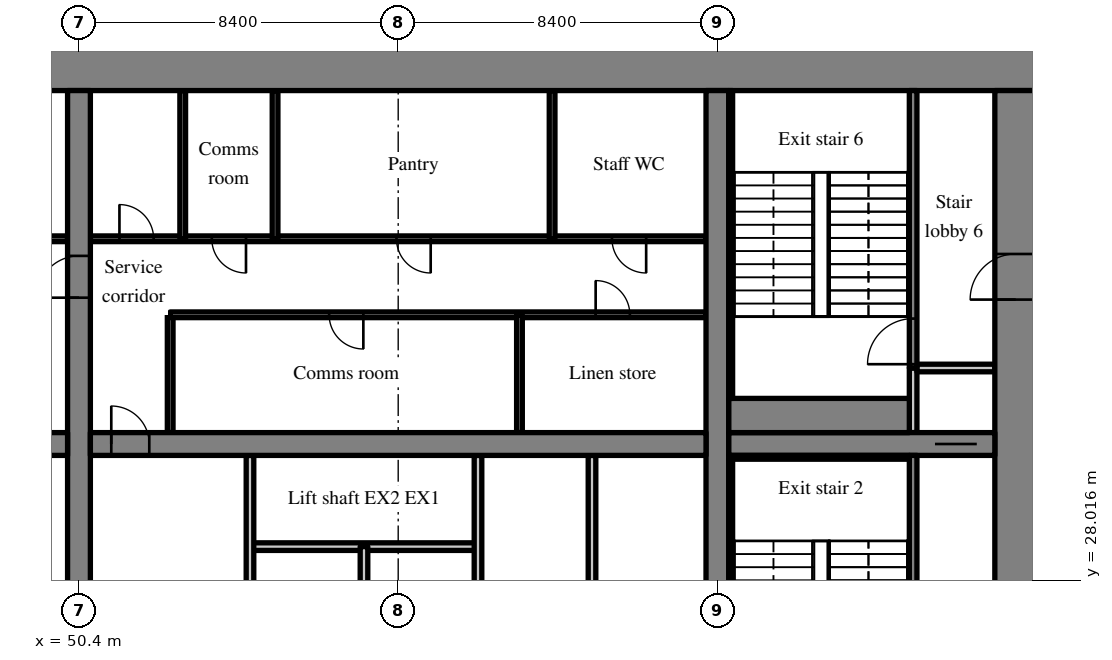
"""IFC4 building model, lengths in metres.
Left out: names, types, materials, properties, quantities, classifications, styles, units other than length and angle.
Written with IfcOpenShell. Run it as: python <this file> out.ifc"""

import sys

from ifc_helpers import new_model, si_unit, direction, frame, frame_2d, origin, place, context, subcontext, project, spatial, rectangle, extrude, source, transform, mapped, element, fill, save


model = new_model("IFC4")
c1 = context("Model", 3, precision=1e-05, world=origin(), true_north=direction((0.0, 1.0)))
c2 = subcontext(c1, "Body", "Model", "MODEL_VIEW")
j1 = project(units=[si_unit("LENGTHUNIT", "METRE"), si_unit("PLANEANGLEUNIT", "RADIAN")], contexts=[c1])
p1 = place(None, origin())
s1 = spatial("IfcSite", under=j1, at=p1, CompositionType="ELEMENT")
p2 = place(p1, origin())
s2 = spatial("IfcBuilding", under=s1, at=p2, CompositionType="ELEMENT")
p3 = place(p2, frame((0.0, 0.0, 43.0)))
s3 = spatial("IfcBuildingStorey", under=s2, at=p3, CompositionType="ELEMENT", Elevation=43.0)
m1 = source(origin(), c2, "Body", "SweptSolid", [
    extrude(rectangle(XDim=50.4, YDim=1.1, at=frame_2d((25.2, 0.0))), origin(), (0.0, 0.0, 1.0), 3.52),
])
p4 = place(p3, frame((25.2, 41.45, 0.0), z_axis=(0.0, 0.0, 1.0), x_axis=(1.0, 0.0, 0.0)))
e1 = element("IfcWall", 1, at=p4, inside=s3, PredefinedType="SHEAR", context=c2, shape_type="MappedRepresentation", body=[
    mapped(m1, transform((0.0, 0.0, 0.0), scale=1.0)),
])
m2 = source(origin(), c2, "Body", "SweptSolid", [
    extrude(rectangle(XDim=17.8, YDim=1.1, at=frame_2d((8.9, 0.0))), origin(), (0.0, 0.0, 1.0), 3.52),
])
p5 = place(p3, frame((75.05, 23.1, 0.0), z_axis=(0.0, 0.0, 1.0), x_axis=(0.0, 1.0, 0.0)))
e2 = element("IfcWall", 2, at=p5, inside=s3, PredefinedType="SHEAR", context=c2, shape_type="MappedRepresentation", body=[
    mapped(m2, transform((0.0, 0.0, 0.0), scale=1.0)),
])
m3 = source(origin(), c2, "Body", "SweptSolid", [
    extrude(rectangle(XDim=1.0, YDim=2.1, at=frame_2d((0.5, 1.05))), frame((0.0, 0.56, 0.0), z_axis=(0.0, -1.0, 0.0), x_axis=(1.0, 0.0, 0.0)), (0.0, 0.0, 1.0), 1.12),
])
p6 = place(p5, frame((2.4, 0.0, 0.0)))
e3 = element("IfcOpeningElement", 3, at=p6, cuts=e2, PredefinedType="OPENING", context=c2, shape_type="MappedRepresentation", body=[
    mapped(m3, transform((0.0, 0.0, 0.0), scale=1.0)),
])
m4 = source(origin(), c2, "Body", "SweptSolid", [
    extrude(rectangle(XDim=1.2, YDim=2.1, at=frame_2d((0.6, 1.05))), frame((0.0, 0.56, 0.0), z_axis=(0.0, -1.0, 0.0), x_axis=(1.0, 0.0, 0.0)), (0.0, 0.0, 1.0), 1.12),
])
p7 = place(p5, frame((12.3, 0.0, 0.0)))
e4 = element("IfcOpeningElement", 4, at=p7, cuts=e2, PredefinedType="OPENING", context=c2, shape_type="MappedRepresentation", body=[
    mapped(m4, transform((0.0, 0.0, 0.0), scale=1.0)),
])
m5 = source(origin(), c2, "Body", "SweptSolid", [
    extrude(rectangle(XDim=17.8, YDim=0.6, at=frame_2d((8.9, 0.0))), origin(), (0.0, 0.0, 1.0), 3.52),
])
p8 = place(p3, frame((50.4, 23.1, 0.0), z_axis=(0.0, 0.0, 1.0), x_axis=(0.0, 1.0, 0.0)))
e5 = element("IfcWall", 5, at=p8, inside=s3, PredefinedType="SHEAR", context=c2, shape_type="MappedRepresentation", body=[
    mapped(m5, transform((0.0, 0.0, 0.0), scale=1.0)),
])
m6 = source(origin(), c2, "Body", "SweptSolid", [
    extrude(rectangle(XDim=1.1, YDim=2.1, at=frame_2d((0.55, 1.05))), frame((0.0, 0.31, 0.0), z_axis=(0.0, -1.0, 0.0), x_axis=(1.0, 0.0, 0.0)), (0.0, 0.0, 1.0), 0.62),
])
p9 = place(p8, frame((12.35, 0.0, 0.0)))
e6 = element("IfcOpeningElement", 6, at=p9, cuts=e5, PredefinedType="OPENING", context=c2, shape_type="MappedRepresentation", body=[
    mapped(m6, transform((0.0, 0.0, 0.0), scale=1.0)),
])
p10 = place(p3, frame((67.2, 23.1, 0.0), z_axis=(0.0, 0.0, 1.0), x_axis=(0.0, 1.0, 0.0)))
e7 = element("IfcWall", 7, at=p10, inside=s3, PredefinedType="SHEAR", context=c2, shape_type="MappedRepresentation", body=[
    mapped(m5, transform((0.0, 0.0, 0.0), scale=1.0)),
])
m7 = source(origin(), c2, "Body", "SweptSolid", [
    extrude(rectangle(XDim=16.2, YDim=0.6, at=frame_2d((8.1, 0.0))), origin(), (0.0, 0.0, 1.0), 3.52),
])
p11 = place(p3, frame((33.9, 31.6, 0.0), z_axis=(0.0, 0.0, 1.0), x_axis=(1.0, 0.0, 0.0)))
e8 = element("IfcWall", 8, at=p11, inside=s3, PredefinedType="SHEAR", context=c2, shape_type="MappedRepresentation", body=[
    mapped(m7, transform((0.0, 0.0, 0.0), scale=1.0)),
])
m8 = source(origin(), c2, "Body", "SweptSolid", [
    extrude(rectangle(XDim=1.0, YDim=2.1, at=frame_2d((0.5, 1.05))), frame((0.0, 0.31, 0.0), z_axis=(0.0, -1.0, 0.0), x_axis=(1.0, 0.0, 0.0)), (0.0, 0.0, 1.0), 0.62),
])
p12 = place(p11, frame((14.65, 0.0, 0.0)))
e9 = element("IfcOpeningElement", 9, at=p12, cuts=e8, PredefinedType="OPENING", context=c2, shape_type="MappedRepresentation", body=[
    mapped(m8, transform((0.0, 0.0, 0.0), scale=1.0)),
])
m9 = source(origin(), c2, "Body", "SweptSolid", [
    extrude(rectangle(XDim=16.2, YDim=0.6, at=frame_2d((8.1, 0.0))), origin(), (0.0, 0.0, 1.0), 3.52),
])
p13 = place(p3, frame((50.7, 31.6, 0.0), z_axis=(0.0, 0.0, 1.0), x_axis=(1.0, 0.0, 0.0)))
e10 = element("IfcWall", 10, at=p13, inside=s3, PredefinedType="SHEAR", context=c2, shape_type="MappedRepresentation", body=[
    mapped(m9, transform((0.0, 0.0, 0.0), scale=1.0)),
])
p14 = place(p13, frame((0.55, 0.0, 0.0)))
e11 = element("IfcOpeningElement", 11, at=p14, cuts=e10, PredefinedType="OPENING", context=c2, shape_type="MappedRepresentation", body=[
    mapped(m8, transform((0.0, 0.0, 0.0), scale=1.0)),
])
m10 = source(origin(), c2, "Body", "SweptSolid", [
    extrude(rectangle(XDim=7.0, YDim=0.6, at=frame_2d((3.5, 0.0))), origin(), (0.0, 0.0, 1.0), 3.52),
])
p15 = place(p3, frame((67.5, 31.6, 0.0), z_axis=(0.0, 0.0, 1.0), x_axis=(1.0, 0.0, 0.0)))
e12 = element("IfcWall", 12, at=p15, inside=s3, PredefinedType="SHEAR", context=c2, shape_type="MappedRepresentation", body=[
    mapped(m10, transform((0.0, 0.0, 0.0), scale=1.0)),
])
p16 = place(p15, frame((5.425, 0.0, 0.0)))
e13 = element("IfcOpeningElement", 13, at=p16, cuts=e12, PredefinedType="OPENING", context=c2, shape_type="MappedRepresentation", body=[
    mapped(m6, transform((0.0, 0.0, 0.0), scale=1.0)),
])
m11 = source(origin(), c2, "Body", "SweptSolid", [
    extrude(rectangle(XDim=16.2, YDim=0.15, at=frame_2d((8.1, 0.0))), origin(), (0.0, 0.0, 1.0), 3.52),
])
p17 = place(p3, frame((33.9, 37.0, 0.0), z_axis=(0.0, 0.0, 1.0), x_axis=(1.0, 0.0, 0.0)))
e14 = element("IfcWall", 14, at=p17, inside=s3, PredefinedType="PARTITIONING", context=c2, shape_type="MappedRepresentation", body=[
    mapped(m11, transform((0.0, 0.0, 0.0), scale=1.0)),
])
m12 = source(origin(), c2, "Body", "SweptSolid", [
    extrude(rectangle(XDim=0.9, YDim=2.1, at=frame_2d((0.45, 1.05))), frame((0.0, 0.085, 0.0), z_axis=(0.0, -1.0, 0.0), x_axis=(1.0, 0.0, 0.0)), (0.0, 0.0, 1.0), 0.17),
])
p18 = place(p17, frame((6.435, 0.0, 0.0)))
e15 = element("IfcOpeningElement", 15, at=p18, cuts=e14, PredefinedType="OPENING", context=c2, shape_type="MappedRepresentation", body=[
    mapped(m12, transform((0.0, 0.0, 0.0), scale=1.0)),
])
p19 = place(p17, frame((14.535, 0.0, 0.0)))
e16 = element("IfcOpeningElement", 16, at=p19, cuts=e14, PredefinedType="OPENING", context=c2, shape_type="MappedRepresentation", body=[
    mapped(m12, transform((0.0, 0.0, 0.0), scale=1.0)),
])
m13 = source(origin(), c2, "Body", "SweptSolid", [
    extrude(rectangle(XDim=6.0, YDim=0.2, at=frame_2d((3.0, 0.0))), origin(), (0.0, 0.0, 1.0), 3.52),
])
p20 = place(p3, frame((60.9, 28.9, 0.0), z_axis=(0.0, 0.0, 1.0), x_axis=(-1.0, 0.0, 0.0)))
e17 = element("IfcWall", 17, at=p20, inside=s3, PredefinedType="SOLIDWALL", context=c2, shape_type="MappedRepresentation", body=[
    mapped(m13, transform((0.0, 0.0, 0.0), scale=1.0)),
])
m14 = source(origin(), c2, "Body", "SweptSolid", [
    extrude(rectangle(XDim=8.2, YDim=0.2, at=frame_2d((4.1, 0.0))), origin(), (0.0, 0.0, 1.0), 3.52),
])
for number, where, z_axis, x_axis in (
    (18, (54.9, 23.1, 0.0), (0.0, 0.0, 1.0), (0.0, 1.0, 0.0)),
    (19, (60.9, 23.1, 0.0), (0.0, 0.0, 1.0), (0.0, 1.0, 0.0)),
):
    element("IfcWall", number, at=place(p3, frame(where, z_axis=z_axis, x_axis=x_axis)), inside=s3, PredefinedType="PARTITIONING", context=c2, shape_type="MappedRepresentation", body=[
        mapped(m14, transform((0.0, 0.0, 0.0), scale=1.0)),
    ])
m15 = source(origin(), c2, "Body", "SweptSolid", [
    extrude(rectangle(XDim=5.8, YDim=0.2, at=frame_2d((2.9, 0.0))), origin(), (0.0, 0.0, 1.0), 3.52),
])
p21 = place(p3, frame((57.9, 23.1, 0.0), z_axis=(0.0, 0.0, 1.0), x_axis=(0.0, 1.0, 0.0)))
e20 = element("IfcWall", 20, at=p21, inside=s3, PredefinedType="PARTITIONING", context=c2, shape_type="MappedRepresentation", body=[
    mapped(m15, transform((0.0, 0.0, 0.0), scale=1.0)),
])
p22 = place(p3, frame((63.9, 23.1, 0.0), z_axis=(0.0, 0.0, 1.0), x_axis=(0.0, 1.0, 0.0)))
e21 = element("IfcWall", 21, at=p22, inside=s3, PredefinedType="PARTITIONING", context=c2, shape_type="MappedRepresentation", body=[
    mapped(m14, transform((0.0, 0.0, 0.0), scale=1.0)),
])
m16 = source(origin(), c2, "Body", "SweptSolid", [
    extrude(rectangle(XDim=3.1, YDim=0.15, at=frame_2d((1.55, 0.0))), origin(), (0.0, 0.0, 1.0), 3.52),
])
p23 = place(p3, frame((52.8, 31.9, 0.0), z_axis=(0.0, 0.0, 1.0), x_axis=(0.0, 1.0, 0.0)))
e22 = element("IfcWall", 22, at=p23, inside=s3, PredefinedType="PARTITIONING", context=c2, shape_type="MappedRepresentation", body=[
    mapped(m16, transform((0.0, 0.0, 0.0), scale=1.0)),
])
m17 = source(origin(), c2, "Body", "SweptSolid", [
    extrude(rectangle(XDim=14.1, YDim=0.15, at=frame_2d((7.05, 0.0))), origin(), (0.0, 0.0, 1.0), 3.52),
])
p24 = place(p3, frame((66.9, 35.0, 0.0), z_axis=(0.0, 0.0, 1.0), x_axis=(-1.0, 0.0, 0.0)))
e23 = element("IfcWall", 23, at=p24, inside=s3, PredefinedType="PARTITIONING", context=c2, shape_type="MappedRepresentation", body=[
    mapped(m17, transform((0.0, 0.0, 0.0), scale=1.0)),
])
p25 = place(p24, frame((2.004, 0.0, 0.0)))
e24 = element("IfcOpeningElement", 24, at=p25, cuts=e23, PredefinedType="OPENING", context=c2, shape_type="MappedRepresentation", body=[
    mapped(m12, transform((0.0, 0.0, 0.0), scale=1.0)),
])
p26 = place(p24, frame((9.017, 0.0, 0.0)))
e25 = element("IfcOpeningElement", 25, at=p26, cuts=e23, PredefinedType="OPENING", context=c2, shape_type="MappedRepresentation", body=[
    mapped(m12, transform((0.0, 0.0, 0.0), scale=1.0)),
])
m18 = source(origin(), c2, "Body", "SweptSolid", [
    extrude(rectangle(XDim=16.2, YDim=0.15, at=frame_2d((8.1, 0.0))), origin(), (0.0, 0.0, 1.0), 3.52),
])
p27 = place(p3, frame((66.9, 37.0, 0.0), z_axis=(0.0, 0.0, 1.0), x_axis=(-1.0, 0.0, 0.0)))
e26 = element("IfcWall", 26, at=p27, inside=s3, PredefinedType="PARTITIONING", context=c2, shape_type="MappedRepresentation", body=[
    mapped(m18, transform((0.0, 0.0, 0.0), scale=1.0)),
])
p28 = place(p27, frame((1.575, 0.0, 0.0)))
e27 = element("IfcOpeningElement", 27, at=p28, cuts=e26, PredefinedType="OPENING", context=c2, shape_type="MappedRepresentation", body=[
    mapped(m12, transform((0.0, 0.0, 0.0), scale=1.0)),
])
p29 = place(p27, frame((7.245, 0.0, 0.0)))
e28 = element("IfcOpeningElement", 28, at=p29, cuts=e26, PredefinedType="OPENING", context=c2, shape_type="MappedRepresentation", body=[
    mapped(m12, transform((0.0, 0.0, 0.0), scale=1.0)),
])
p30 = place(p27, frame((12.105, 0.0, 0.0)))
e29 = element("IfcOpeningElement", 29, at=p30, cuts=e26, PredefinedType="OPENING", context=c2, shape_type="MappedRepresentation", body=[
    mapped(m12, transform((0.0, 0.0, 0.0), scale=1.0)),
])
p31 = place(p27, frame((14.535, 0.0, 0.0)))
e30 = element("IfcOpeningElement", 30, at=p31, cuts=e26, PredefinedType="OPENING", context=c2, shape_type="MappedRepresentation", body=[
    mapped(m12, transform((0.0, 0.0, 0.0), scale=1.0)),
])
p32 = place(p3, frame((61.991, 31.9, 0.0), z_axis=(0.0, 0.0, 1.0), x_axis=(0.0, 1.0, 0.0)))
e31 = element("IfcWall", 31, at=p32, inside=s3, PredefinedType="PARTITIONING", context=c2, shape_type="MappedRepresentation", body=[
    mapped(m16, transform((0.0, 0.0, 0.0), scale=1.0)),
])
m19 = source(origin(), c2, "Body", "SweptSolid", [
    extrude(rectangle(XDim=3.9, YDim=0.15, at=frame_2d((1.95, 0.0))), origin(), (0.0, 0.0, 1.0), 3.52),
])
for number, where, z_axis, x_axis in (
    (32, (62.85, 37.0, 0.0), (0.0, 0.0, 1.0), (0.0, 1.0, 0.0)),
    (33, (55.56, 37.0, 0.0), (0.0, 0.0, 1.0), (0.0, 1.0, 0.0)),
    (34, (53.13, 37.0, 0.0), (0.0, 0.0, 1.0), (0.0, 1.0, 0.0)),
):
    element("IfcWall", number, at=place(p3, frame(where, z_axis=z_axis, x_axis=x_axis)), inside=s3, PredefinedType="PARTITIONING", context=c2, shape_type="MappedRepresentation", body=[
        mapped(m19, transform((0.0, 0.0, 0.0), scale=1.0)),
    ])
m20 = source(origin(), c2, "Body", "SweptSolid", [
    extrude(rectangle(XDim=8.2, YDim=0.2, at=frame_2d((4.1, 0.0))), origin(), (0.0, 0.0, 1.0), 3.52),
])
p33 = place(p3, frame((72.35, 23.1, 0.0), z_axis=(0.0, 0.0, 1.0), x_axis=(0.0, 1.0, 0.0)))
e35 = element("IfcWall", 35, at=p33, inside=s3, PredefinedType="SOLIDWALL", context=c2, shape_type="MappedRepresentation", body=[
    mapped(m20, transform((0.0, 0.0, 0.0), scale=1.0)),
])
m21 = source(origin(), c2, "Body", "SweptSolid", [
    extrude(rectangle(XDim=1.2, YDim=2.1, at=frame_2d((0.6, 1.05))), frame((0.0, 0.11, 0.0), z_axis=(0.0, -1.0, 0.0), x_axis=(1.0, 0.0, 0.0)), (0.0, 0.0, 1.0), 0.22),
])
p34 = place(p33, frame((0.5, 0.0, 0.0)))
e36 = element("IfcOpeningElement", 36, at=p34, cuts=e35, PredefinedType="OPENING", context=c2, shape_type="MappedRepresentation", body=[
    mapped(m21, transform((0.0, 0.0, 0.0), scale=1.0)),
])
m22 = source(origin(), c2, "Body", "SweptSolid", [
    extrude(rectangle(XDim=1.7, YDim=0.2, at=frame_2d((0.85, 0.0))), origin(), (0.0, 0.0, 1.0), 3.52),
])
p35 = place(p3, frame((72.35, 31.9, 0.0), z_axis=(0.0, 0.0, 1.0), x_axis=(0.0, 1.0, 0.0)))
e37 = element("IfcWall", 37, at=p35, inside=s3, PredefinedType="SOLIDWALL", context=c2, shape_type="MappedRepresentation", body=[
    mapped(m22, transform((0.0, 0.0, 0.0), scale=1.0)),
])
m23 = source(origin(), c2, "Body", "SweptSolid", [
    extrude(rectangle(XDim=2.05, YDim=0.2, at=frame_2d((1.025, 0.0))), origin(), (0.0, 0.0, 1.0), 3.52),
])
p36 = place(p3, frame((72.45, 33.6, 0.0), z_axis=(0.0, 0.0, 1.0), x_axis=(1.0, 0.0, 0.0)))
e38 = element("IfcWall", 38, at=p36, inside=s3, PredefinedType="SOLIDWALL", context=c2, shape_type="MappedRepresentation", body=[
    mapped(m23, transform((0.0, 0.0, 0.0), scale=1.0)),
])
m24 = source(origin(), c2, "Body", "SweptSolid", [
    extrude(rectangle(XDim=7.3, YDim=0.2, at=frame_2d((3.65, 0.0))), origin(), (0.0, 0.0, 1.0), 3.52),
])
p37 = place(p3, frame((72.35, 33.6, 0.0), z_axis=(0.0, 0.0, 1.0), x_axis=(0.0, 1.0, 0.0)))
e39 = element("IfcWall", 39, at=p37, inside=s3, PredefinedType="SOLIDWALL", context=c2, shape_type="MappedRepresentation", body=[
    mapped(m24, transform((0.0, 0.0, 0.0), scale=1.0)),
])
p38 = place(p37, frame((0.1, 0.0, 0.0)))
e40 = element("IfcOpeningElement", 40, at=p38, cuts=e39, PredefinedType="OPENING", context=c2, shape_type="MappedRepresentation", body=[
    mapped(m21, transform((0.0, 0.0, 0.0), scale=1.0)),
])
m25 = source(origin(), c2, "Body", "SweptSolid", [
    extrude(rectangle(XDim=4.75, YDim=0.1, at=frame_2d((2.375, 0.0))), origin(), (0.0, 0.0, 1.0), 3.52),
])
p39 = place(p3, frame((67.5, 31.25, 0.0), z_axis=(0.0, 0.0, 1.0), x_axis=(1.0, 0.0, 0.0)))
e41 = element("IfcWall", 41, at=p39, inside=s3, PredefinedType="SOLIDWALL", context=c2, shape_type="MappedRepresentation", body=[
    mapped(m25, transform((0.0, 0.0, 0.0), scale=1.0)),
])
m26 = source(origin(), c2, "Body", "SweptSolid", [
    extrude(rectangle(XDim=8.1, YDim=0.1, at=frame_2d((4.05, 0.0))), origin(), (0.0, 0.0, 1.0), 3.52),
])
p40 = place(p3, frame((67.55, 23.1, 0.0), z_axis=(0.0, 0.0, 1.0), x_axis=(0.0, 1.0, 0.0)))
e42 = element("IfcWall", 42, at=p40, inside=s3, PredefinedType="SOLIDWALL", context=c2, shape_type="MappedRepresentation", body=[
    mapped(m26, transform((0.0, 0.0, 0.0), scale=1.0)),
])
m27 = source(origin(), c2, "Body", "SweptSolid", [
    extrude(rectangle(XDim=4.75, YDim=0.9, at=frame_2d((2.375, 0.0))), origin(), (0.0, 0.0, 1.0), 3.52),
])
p41 = place(p3, frame((67.5, 32.35, 0.0), z_axis=(0.0, 0.0, 1.0), x_axis=(1.0, 0.0, 0.0)))
e43 = element("IfcWall", 43, at=p41, inside=s3, PredefinedType="SOLIDWALL", context=c2, shape_type="MappedRepresentation", body=[
    mapped(m27, transform((0.0, 0.0, 0.0), scale=1.0)),
])
p42 = place(p3, frame((67.55, 32.8, 0.0), z_axis=(0.0, 0.0, 1.0), x_axis=(0.0, 1.0, 0.0)))
e44 = element("IfcWall", 44, at=p42, inside=s3, PredefinedType="SOLIDWALL", context=c2, shape_type="MappedRepresentation", body=[
    mapped(m26, transform((0.0, 0.0, 0.0), scale=1.0)),
])
m28 = source(origin(), c2, "Body", "SweptSolid", [
    extrude(rectangle(XDim=1.0, YDim=2.1, at=frame_2d((0.5, 1.05))), frame((0.0, 0.025, 0.0), z_axis=(0.0, -1.0, 0.0), x_axis=(1.0, 0.0, 0.0)), (0.0, 0.0, 1.0), 0.05),
])
p43 = place(p14, origin())
e45 = element("IfcDoor", 45, at=p43, inside=s3, OperationType="SINGLE_SWING_LEFT", PredefinedType="DOOR", context=c2, shape_type="MappedRepresentation", body=[
    mapped(m28, transform((0.0, 0.0, 0.0), scale=1.0)),
])
fill(e11, e45)
m29 = source(origin(), c2, "Body", "SweptSolid", [
    extrude(rectangle(XDim=0.9, YDim=2.1, at=frame_2d((0.45, 1.05))), frame((0.0, 0.025, 0.0), z_axis=(0.0, -1.0, 0.0), x_axis=(1.0, 0.0, 0.0)), (0.0, 0.0, 1.0), 0.05),
])
p44 = place(p25, origin())
e46 = element("IfcDoor", 46, at=p44, inside=s3, OperationType="SINGLE_SWING_RIGHT", PredefinedType="DOOR", context=c2, shape_type="MappedRepresentation", body=[
    mapped(m29, transform((0.0, 0.0, 0.0), scale=1.0)),
])
fill(e24, e46)
p45 = place(p26, origin())
e47 = element("IfcDoor", 47, at=p45, inside=s3, OperationType="SINGLE_SWING_LEFT", PredefinedType="DOOR", context=c2, shape_type="MappedRepresentation", body=[
    mapped(m29, transform((0.0, 0.0, 0.0), scale=1.0)),
])
fill(e25, e47)
p46 = place(p28, origin())
e48 = element("IfcDoor", 48, at=p46, inside=s3, OperationType="SINGLE_SWING_LEFT", PredefinedType="DOOR", context=c2, shape_type="MappedRepresentation", body=[
    mapped(m29, transform((0.0, 0.0, 0.0), scale=1.0)),
])
fill(e27, e48)
p47 = place(p29, origin())
e49 = element("IfcDoor", 49, at=p47, inside=s3, OperationType="SINGLE_SWING_LEFT", PredefinedType="DOOR", context=c2, shape_type="MappedRepresentation", body=[
    mapped(m29, transform((0.0, 0.0, 0.0), scale=1.0)),
])
fill(e28, e49)
p48 = place(p30, origin())
e50 = element("IfcDoor", 50, at=p48, inside=s3, OperationType="SINGLE_SWING_LEFT", PredefinedType="DOOR", context=c2, shape_type="MappedRepresentation", body=[
    mapped(m29, transform((0.0, 0.0, 0.0), scale=1.0)),
])
fill(e29, e50)
p49 = place(p31, origin())
e51 = element("IfcDoor", 51, at=p49, inside=s3, OperationType="SINGLE_SWING_RIGHT", PredefinedType="DOOR", context=c2, shape_type="MappedRepresentation", body=[
    mapped(m29, transform((0.0, 0.0, 0.0), scale=1.0)),
])
fill(e30, e51)
m30 = source(origin(), c2, "Body", "SweptSolid", [
    extrude(rectangle(XDim=1.1, YDim=2.1, at=frame_2d((0.55, 1.05))), frame((0.0, 0.025, 0.0), z_axis=(0.0, -1.0, 0.0), x_axis=(1.0, 0.0, 0.0)), (0.0, 0.0, 1.0), 0.05),
])
p50 = place(p16, origin())
e52 = element("IfcDoor", 52, at=p50, inside=s3, OperationType="SLIDING_TO_RIGHT", PredefinedType="DOOR", context=c2, shape_type="MappedRepresentation", body=[
    mapped(m30, transform((0.0, 0.0, 0.0), scale=1.0)),
])
fill(e13, e52)
m31 = source(origin(), c2, "Body", "SweptSolid", [
    extrude(rectangle(XDim=1.2, YDim=2.1, at=frame_2d((0.6, 1.05))), frame((0.0, 0.025, 0.0), z_axis=(0.0, -1.0, 0.0), x_axis=(1.0, 0.0, 0.0)), (0.0, 0.0, 1.0), 0.05),
])
p51 = place(p38, origin())
e53 = element("IfcDoor", 53, at=p51, inside=s3, OperationType="SINGLE_SWING_LEFT", PredefinedType="DOOR", context=c2, shape_type="MappedRepresentation", body=[
    mapped(m31, transform((0.0, 0.0, 0.0), scale=1.0)),
])
fill(e40, e53)
p52 = place(p7, origin())
e54 = element("IfcDoor", 54, at=p52, inside=s3, OperationType="SINGLE_SWING_LEFT", PredefinedType="DOOR", context=c2, shape_type="MappedRepresentation", body=[
    mapped(m31, transform((0.0, 0.0, 0.0), scale=1.0)),
])
fill(e4, e54)
p53 = place(p9, origin())
e55 = element("IfcDoor", 55, at=p53, inside=s3, OperationType="SINGLE_SWING_LEFT", PredefinedType="DOOR", context=c2, shape_type="MappedRepresentation", body=[
    mapped(m30, transform((0.0, 0.0, 0.0), scale=1.0)),
])
fill(e6, e55)
save(model, sys.argv[1])
